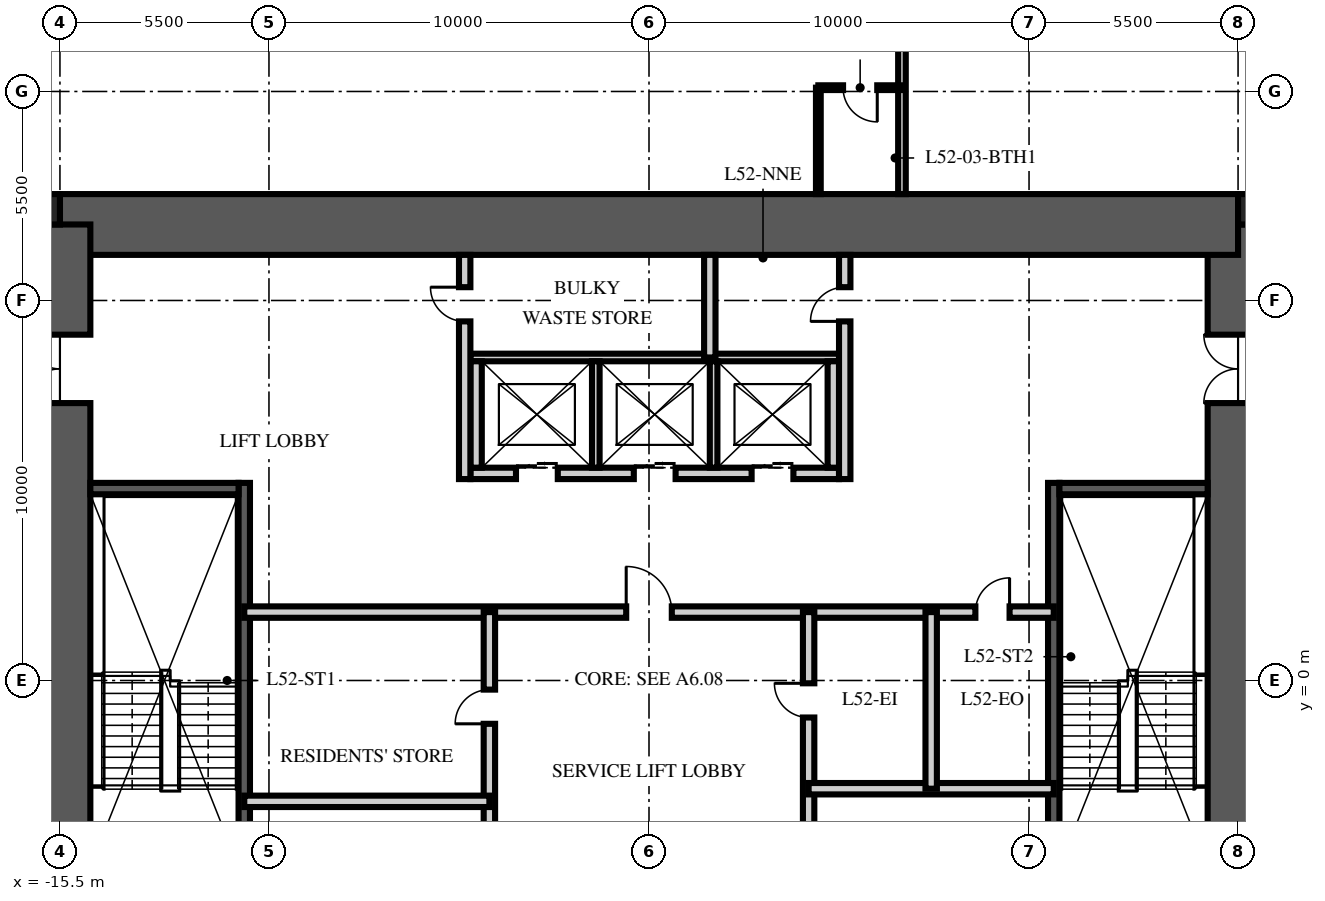
"""IFC4 building model, lengths in metres.
Left out: names, types, materials, properties, quantities, classifications, styles, units other than length and angle.
Written with IfcOpenShell. Run it as: python <this file> out.ifc"""

import sys

from ifc_helpers import new_model, si_unit, direction, frame, frame_2d, origin, origin_2d, place, context, subcontext, project, spatial, rectangle, extrude, element, fill, save


model = new_model("IFC4")
c1 = context("Model", 3, precision=1e-05, world=origin(), true_north=direction((0.0, 1.0)))
c2 = subcontext(c1, "Body", "Model", "MODEL_VIEW")
j1 = project(units=[si_unit("LENGTHUNIT", "METRE"), si_unit("PLANEANGLEUNIT", "RADIAN")], contexts=[c1])
p1 = place(None, origin())
s1 = spatial("IfcSite", under=j1, at=p1, CompositionType="ELEMENT")
p2 = place(p1, origin())
s2 = spatial("IfcBuilding", under=s1, at=p2, CompositionType="ELEMENT")
p3 = place(p2, frame((0.0, 0.0, 210.75)))
s3 = spatial("IfcBuildingStorey", under=s2, at=p3, CompositionType="ELEMENT", Elevation=210.75)
p4 = place(p3, frame((15.5, -12.0, -0.25), z_axis=(0.0, 0.0, 1.0), x_axis=(0.0, 1.0, 0.0)))
e1 = element("IfcWall", 1, at=p4, inside=s3, PredefinedType="SHEAR", context=c2, shape_type="SweptSolid", body=[
    extrude(rectangle(XDim=24.0, YDim=1.6, at=frame_2d((12.0, 0.0))), origin(), (0.0, 0.0, 1.0), 3.75),
])
p5 = place(p4, frame((3.2, 0.0, 0.25)))
e2 = element("IfcOpeningElement", 2, at=p5, cuts=e1, PredefinedType="OPENING", context=c2, shape_type="SweptSolid", body=[
    extrude(rectangle(XDim=1.2, YDim=2.1, at=frame_2d((0.6, 1.05))), frame((0.0, 0.81, 0.0), z_axis=(0.0, -1.0, 0.0), x_axis=(1.0, 0.0, 0.0)), (0.0, 0.0, 1.0), 1.62),
])
p6 = place(p4, frame((19.3, 0.0, 0.25)))
e3 = element("IfcOpeningElement", 3, at=p6, cuts=e1, PredefinedType="OPENING", context=c2, shape_type="SweptSolid", body=[
    extrude(rectangle(XDim=1.8, YDim=2.1, at=frame_2d((0.9, 1.05))), frame((0.0, 0.81, 0.0), z_axis=(0.0, -1.0, 0.0), x_axis=(1.0, 0.0, 0.0)), (0.0, 0.0, 1.0), 1.62),
])
p7 = place(p3, frame((-15.5, 12.0, -0.25), z_axis=(0.0, 0.0, 1.0), x_axis=(1.0, 0.0, 0.0)))
e4 = element("IfcWall", 4, at=p7, inside=s3, PredefinedType="SHEAR", context=c2, shape_type="SweptSolid", body=[
    extrude(rectangle(XDim=31.0, YDim=1.6, at=frame_2d((15.5, 0.0))), origin(), (0.0, 0.0, 1.0), 3.75),
])
p8 = place(p3, frame((-15.5, -12.0, -0.25), z_axis=(0.0, 0.0, 1.0), x_axis=(0.0, 1.0, 0.0)))
e5 = element("IfcWall", 5, at=p8, inside=s3, PredefinedType="SHEAR", context=c2, shape_type="SweptSolid", body=[
    extrude(rectangle(XDim=24.0, YDim=1.6, at=frame_2d((12.0, 0.0))), origin(), (0.0, 0.0, 1.0), 3.75),
])
p9 = place(p8, frame((3.2, 0.0, 0.25)))
e6 = element("IfcOpeningElement", 6, at=p9, cuts=e5, PredefinedType="OPENING", context=c2, shape_type="SweptSolid", body=[
    extrude(rectangle(XDim=1.2, YDim=2.1, at=frame_2d((0.6, 1.05))), frame((0.0, 0.81, 0.0), z_axis=(0.0, -1.0, 0.0), x_axis=(1.0, 0.0, 0.0)), (0.0, 0.0, 1.0), 1.62),
])
p10 = place(p8, frame((19.3, 0.0, 0.25)))
e7 = element("IfcOpeningElement", 7, at=p10, cuts=e5, PredefinedType="OPENING", context=c2, shape_type="SweptSolid", body=[
    extrude(rectangle(XDim=1.8, YDim=2.1, at=frame_2d((0.9, 1.05))), frame((0.0, 0.81, 0.0), z_axis=(0.0, -1.0, 0.0), x_axis=(1.0, 0.0, 0.0)), (0.0, 0.0, 1.0), 1.62),
])
for number, where, z_axis, x_axis in (
    (8, (15.9, 12.4, -0.25), (0.0, 0.0, 1.0), (1.0, 0.0, 0.0)),
    (9, (-15.9, 12.4, -0.25), (0.0, 0.0, 1.0), (1.0, 0.0, 0.0)),
):
    element("IfcColumn", number, at=place(p3, frame(where, z_axis=z_axis, x_axis=x_axis)), inside=s3, PredefinedType="COLUMN", context=c2, shape_type="SweptSolid", body=[
        extrude(rectangle(XDim=0.8, YDim=0.8, at=origin_2d()), origin(), (0.0, 0.0, 1.0), 3.75),
    ])
p11 = place(p3, frame((-10.65, -4.9, 0.0), z_axis=(0.0, 0.0, 1.0), x_axis=(0.0, 1.0, 0.0)))
e10 = element("IfcWall", 10, at=p11, inside=s3, PredefinedType="SOLIDWALL", context=c2, shape_type="SweptSolid", body=[
    extrude(rectangle(XDim=10.1, YDim=0.3, at=frame_2d((5.05, 0.0))), origin(), (0.0, 0.0, 1.0), 3.5),
])
p12 = place(p3, frame((-14.7, 5.05, 0.0), z_axis=(0.0, 0.0, 1.0), x_axis=(1.0, 0.0, 0.0)))
e11 = element("IfcWall", 11, at=p12, inside=s3, PredefinedType="SOLIDWALL", context=c2, shape_type="SweptSolid", body=[
    extrude(rectangle(XDim=3.9, YDim=0.3, at=frame_2d((1.95, 0.0))), origin(), (0.0, 0.0, 1.0), 3.5),
])
p13 = place(p3, frame((10.65, -4.9, 0.0), z_axis=(0.0, 0.0, 1.0), x_axis=(0.0, 1.0, 0.0)))
e12 = element("IfcWall", 12, at=p13, inside=s3, PredefinedType="SOLIDWALL", context=c2, shape_type="SweptSolid", body=[
    extrude(rectangle(XDim=10.1, YDim=0.3, at=frame_2d((5.05, 0.0))), origin(), (0.0, 0.0, 1.0), 3.5),
])
p14 = place(p3, frame((14.7, 5.05, 0.0), z_axis=(0.0, 0.0, 1.0), x_axis=(-1.0, 0.0, 0.0)))
e13 = element("IfcWall", 13, at=p14, inside=s3, PredefinedType="SOLIDWALL", context=c2, shape_type="SweptSolid", body=[
    extrude(rectangle(XDim=3.9, YDim=0.3, at=frame_2d((1.95, 0.0))), origin(), (0.0, 0.0, 1.0), 3.5),
])
p15 = place(p3, frame((-4.7, 5.45, 0.0), z_axis=(0.0, 0.0, 1.0), x_axis=(1.0, 0.0, 0.0)))
e14 = element("IfcWall", 14, at=p15, inside=s3, PredefinedType="PARTITIONING", context=c2, shape_type="SweptSolid", body=[
    extrude(rectangle(XDim=9.7, YDim=0.3, at=frame_2d((4.85, 0.0))), origin(), (0.0, 0.0, 1.0), 3.5),
])
p16 = place(p15, frame((1.2, 0.0, 0.0)))
e15 = element("IfcOpeningElement", 15, at=p16, cuts=e14, PredefinedType="OPENING", context=c2, shape_type="SweptSolid", body=[
    extrude(rectangle(XDim=1.1, YDim=2.1, at=frame_2d((0.55, 1.05))), frame((0.0, 0.16, 0.0), z_axis=(0.0, -1.0, 0.0), x_axis=(1.0, 0.0, 0.0)), (0.0, 0.0, 1.0), 0.32),
])
p17 = place(p15, frame((4.3, 0.0, 0.0)))
e16 = element("IfcOpeningElement", 16, at=p17, cuts=e14, PredefinedType="OPENING", context=c2, shape_type="SweptSolid", body=[
    extrude(rectangle(XDim=1.1, YDim=2.1, at=frame_2d((0.55, 1.05))), frame((0.0, 0.16, 0.0), z_axis=(0.0, -1.0, 0.0), x_axis=(1.0, 0.0, 0.0)), (0.0, 0.0, 1.0), 0.32),
])
p18 = place(p15, frame((7.4, 0.0, 0.0)))
e17 = element("IfcOpeningElement", 17, at=p18, cuts=e14, PredefinedType="OPENING", context=c2, shape_type="SweptSolid", body=[
    extrude(rectangle(XDim=1.1, YDim=2.1, at=frame_2d((0.55, 1.05))), frame((0.0, 0.16, 0.0), z_axis=(0.0, -1.0, 0.0), x_axis=(1.0, 0.0, 0.0)), (0.0, 0.0, 1.0), 0.32),
])
p19 = place(p3, frame((-4.7, 8.5, 0.0), z_axis=(0.0, 0.0, 1.0), x_axis=(1.0, 0.0, 0.0)))
e18 = element("IfcWall", 18, at=p19, inside=s3, PredefinedType="PARTITIONING", context=c2, shape_type="SweptSolid", body=[
    extrude(rectangle(XDim=9.7, YDim=0.2, at=frame_2d((4.85, 0.0))), origin(), (0.0, 0.0, 1.0), 3.5),
])
for number, where, z_axis, x_axis in (
    (19, (-4.55, 5.6, 0.0), (0.0, 0.0, 1.0), (0.0, 1.0, 0.0)),
    (20, (4.85, 5.6, 0.0), (0.0, 0.0, 1.0), (0.0, 1.0, 0.0)),
):
    element("IfcWall", number, at=place(p3, frame(where, z_axis=z_axis, x_axis=x_axis)), inside=s3, PredefinedType="PARTITIONING", context=c2, shape_type="SweptSolid", body=[
        extrude(rectangle(XDim=2.8, YDim=0.3, at=frame_2d((1.4, 0.0))), origin(), (0.0, 0.0, 1.0), 3.5),
    ])
for number, where, z_axis, x_axis in (
    (21, (-1.4, 5.6, 0.0), (0.0, 0.0, 1.0), (0.0, 1.0, 0.0)),
    (22, (1.7, 5.6, 0.0), (0.0, 0.0, 1.0), (0.0, 1.0, 0.0)),
):
    element("IfcWall", number, at=place(p3, frame(where, z_axis=z_axis, x_axis=x_axis)), inside=s3, PredefinedType="PARTITIONING", context=c2, shape_type="SweptSolid", body=[
        extrude(rectangle(XDim=2.8, YDim=0.2, at=frame_2d((1.4, 0.0))), origin(), (0.0, 0.0, 1.0), 3.5),
    ])
p20 = place(p3, frame((-10.65, 1.8, 0.0), z_axis=(0.0, 0.0, 1.0), x_axis=(1.0, 0.0, 0.0)))
e23 = element("IfcWall", 23, at=p20, inside=s3, PredefinedType="PARTITIONING", context=c2, shape_type="SweptSolid", body=[
    extrude(rectangle(XDim=21.3, YDim=0.3, at=frame_2d((10.65, 0.0))), origin(), (0.0, 0.0, 1.0), 3.5),
])
p21 = place(p20, frame((10.05, 0.0, 0.0)))
e24 = element("IfcOpeningElement", 24, at=p21, cuts=e23, PredefinedType="OPENING", context=c2, shape_type="SweptSolid", body=[
    extrude(rectangle(XDim=1.2, YDim=2.1, at=frame_2d((0.6, 1.05))), frame((0.0, 0.16, 0.0), z_axis=(0.0, -1.0, 0.0), x_axis=(1.0, 0.0, 0.0)), (0.0, 0.0, 1.0), 0.32),
])
p22 = place(p20, frame((19.238, 0.0, 0.0)))
e25 = element("IfcOpeningElement", 25, at=p22, cuts=e23, PredefinedType="OPENING", context=c2, shape_type="SweptSolid", body=[
    extrude(rectangle(XDim=0.9, YDim=2.1, at=frame_2d((0.45, 1.05))), frame((0.0, 0.16, 0.0), z_axis=(0.0, -1.0, 0.0), x_axis=(1.0, 0.0, 0.0)), (0.0, 0.0, 1.0), 0.32),
])
p23 = place(p3, frame((-4.2, -6.65, 0.0), z_axis=(0.0, 0.0, 1.0), x_axis=(0.0, 1.0, 0.0)))
e26 = element("IfcWall", 26, at=p23, inside=s3, PredefinedType="PARTITIONING", context=c2, shape_type="SweptSolid", body=[
    extrude(rectangle(XDim=8.45, YDim=0.3, at=frame_2d((4.225, 0.0))), origin(), (0.0, 0.0, 1.0), 3.5),
])
p24 = place(p23, frame((1.285, 0.0, 0.0)))
e27 = element("IfcOpeningElement", 27, at=p24, cuts=e26, PredefinedType="OPENING", context=c2, shape_type="SweptSolid", body=[
    extrude(rectangle(XDim=0.9, YDim=2.1, at=frame_2d((0.45, 1.05))), frame((0.0, 0.16, 0.0), z_axis=(0.0, -1.0, 0.0), x_axis=(1.0, 0.0, 0.0)), (0.0, 0.0, 1.0), 0.32),
])
p25 = place(p23, frame((5.51, 0.0, 0.0)))
e28 = element("IfcOpeningElement", 28, at=p25, cuts=e26, PredefinedType="OPENING", context=c2, shape_type="SweptSolid", body=[
    extrude(rectangle(XDim=0.9, YDim=2.1, at=frame_2d((0.45, 1.05))), frame((0.0, 0.16, 0.0), z_axis=(0.0, -1.0, 0.0), x_axis=(1.0, 0.0, 0.0)), (0.0, 0.0, 1.0), 0.32),
])
p26 = place(p3, frame((4.2, -6.65, 0.0), z_axis=(0.0, 0.0, 1.0), x_axis=(0.0, 1.0, 0.0)))
e29 = element("IfcWall", 29, at=p26, inside=s3, PredefinedType="PARTITIONING", context=c2, shape_type="SweptSolid", body=[
    extrude(rectangle(XDim=8.45, YDim=0.3, at=frame_2d((4.225, 0.0))), origin(), (0.0, 0.0, 1.0), 3.5),
])
p27 = place(p26, frame((1.451, 0.0, 0.0)))
e30 = element("IfcOpeningElement", 30, at=p27, cuts=e29, PredefinedType="OPENING", context=c2, shape_type="SweptSolid", body=[
    extrude(rectangle(XDim=0.9, YDim=2.1, at=frame_2d((0.45, 1.05))), frame((0.0, 0.16, 0.0), z_axis=(0.0, -1.0, 0.0), x_axis=(1.0, 0.0, 0.0)), (0.0, 0.0, 1.0), 0.32),
])
p28 = place(p26, frame((5.676, 0.0, 0.0)))
e31 = element("IfcOpeningElement", 31, at=p28, cuts=e29, PredefinedType="OPENING", context=c2, shape_type="SweptSolid", body=[
    extrude(rectangle(XDim=0.9, YDim=2.1, at=frame_2d((0.45, 1.05))), frame((0.0, 0.16, 0.0), z_axis=(0.0, -1.0, 0.0), x_axis=(1.0, 0.0, 0.0)), (0.0, 0.0, 1.0), 0.32),
])
for number, where, z_axis, x_axis in (
    (32, (-10.65, -3.18, 0.0), (0.0, 0.0, 1.0), (1.0, 0.0, 0.0)),
    (33, (10.65, -2.848, 0.0), (0.0, 0.0, 1.0), (-1.0, 0.0, 0.0)),
):
    element("IfcWall", number, at=place(p3, frame(where, z_axis=z_axis, x_axis=x_axis)), inside=s3, PredefinedType="PARTITIONING", context=c2, shape_type="SweptSolid", body=[
        extrude(rectangle(XDim=6.45, YDim=0.3, at=frame_2d((3.225, 0.0))), origin(), (0.0, 0.0, 1.0), 3.5),
    ])
p29 = place(p3, frame((7.425, -2.848, 0.0), z_axis=(0.0, 0.0, 1.0), x_axis=(0.0, 1.0, 0.0)))
e34 = element("IfcWall", 34, at=p29, inside=s3, PredefinedType="PARTITIONING", context=c2, shape_type="SweptSolid", body=[
    extrude(rectangle(XDim=4.648, YDim=0.3, at=frame_2d((2.324, 0.0))), origin(), (0.0, 0.0, 1.0), 3.5),
])
p30 = place(p3, frame((-4.85, 5.3, 0.0), z_axis=(0.0, 0.0, 1.0), x_axis=(0.0, 1.0, 0.0)))
e35 = element("IfcWall", 35, at=p30, inside=s3, PredefinedType="PARTITIONING", context=c2, shape_type="SweptSolid", body=[
    extrude(rectangle(XDim=5.9, YDim=0.3, at=frame_2d((2.95, 0.0))), origin(), (0.0, 0.0, 1.0), 3.5),
])
p31 = place(p30, frame((4.15, 0.0, 0.0)))
e36 = element("IfcOpeningElement", 36, at=p31, cuts=e35, PredefinedType="OPENING", context=c2, shape_type="SweptSolid", body=[
    extrude(rectangle(XDim=0.9, YDim=2.1, at=frame_2d((0.45, 1.05))), frame((0.0, 0.16, 0.0), z_axis=(0.0, -1.0, 0.0), x_axis=(1.0, 0.0, 0.0)), (0.0, 0.0, 1.0), 0.32),
])
p32 = place(p3, frame((5.15, 5.3, 0.0), z_axis=(0.0, 0.0, 1.0), x_axis=(0.0, 1.0, 0.0)))
e37 = element("IfcWall", 37, at=p32, inside=s3, PredefinedType="PARTITIONING", context=c2, shape_type="SweptSolid", body=[
    extrude(rectangle(XDim=5.9, YDim=0.3, at=frame_2d((2.95, 0.0))), origin(), (0.0, 0.0, 1.0), 3.5),
])
p33 = place(p32, frame((4.15, 0.0, 0.0)))
e38 = element("IfcOpeningElement", 38, at=p33, cuts=e37, PredefinedType="OPENING", context=c2, shape_type="SweptSolid", body=[
    extrude(rectangle(XDim=0.9, YDim=2.1, at=frame_2d((0.45, 1.05))), frame((0.0, 0.16, 0.0), z_axis=(0.0, -1.0, 0.0), x_axis=(1.0, 0.0, 0.0)), (0.0, 0.0, 1.0), 0.32),
])
p34 = place(p3, frame((1.6, 8.5, 0.0), z_axis=(0.0, 0.0, 1.0), x_axis=(0.0, 1.0, 0.0)))
e39 = element("IfcWall", 39, at=p34, inside=s3, PredefinedType="PARTITIONING", context=c2, shape_type="SweptSolid", body=[
    extrude(rectangle(XDim=2.7, YDim=0.3, at=frame_2d((1.35, 0.0))), origin(), (0.0, 0.0, 1.0), 3.5),
])
p35 = place(p3, frame((6.656, 12.8, 0.0), z_axis=(0.0, 0.0, 1.0), x_axis=(0.0, 1.0, 0.0)))
e40 = element("IfcWall", 40, at=p35, inside=s3, PredefinedType="PARTITIONING", context=c2, shape_type="SweptSolid", body=[
    extrude(rectangle(XDim=13.65, YDim=0.2, at=frame_2d((6.825, 0.0))), origin(), (0.0, 0.0, 1.0), 2.91),
])
p36 = place(p3, frame((6.656, 15.6, 0.0), z_axis=(0.0, 0.0, 1.0), x_axis=(-1.0, 0.0, 0.0)))
e41 = element("IfcWall", 41, at=p36, inside=s3, PredefinedType="PARTITIONING", context=c2, shape_type="SweptSolid", body=[
    extrude(rectangle(XDim=2.2, YDim=0.125, at=frame_2d((1.1, 0.0))), origin(), (0.0, 0.0, 1.0), 3.5),
])
p37 = place(p36, frame((0.65, 0.0, 0.0)))
e42 = element("IfcOpeningElement", 42, at=p37, cuts=e41, PredefinedType="OPENING", context=c2, shape_type="SweptSolid", body=[
    extrude(rectangle(XDim=0.9, YDim=2.1, at=frame_2d((0.45, 1.05))), frame((0.0, 0.073, 0.0), z_axis=(0.0, -1.0, 0.0), x_axis=(1.0, 0.0, 0.0)), (0.0, 0.0, 1.0), 0.145),
])
p38 = place(p3, frame((4.456, 12.8, 0.0), z_axis=(0.0, 0.0, 1.0), x_axis=(0.0, 1.0, 0.0)))
e43 = element("IfcWall", 43, at=p38, inside=s3, PredefinedType="PARTITIONING", context=c2, shape_type="SweptSolid", body=[
    extrude(rectangle(XDim=2.8, YDim=0.125, at=frame_2d((1.4, 0.0))), origin(), (0.0, 0.0, 1.0), 3.5),
])
p39 = place(p10, origin())
e44 = element("IfcDoor", 44, at=p39, inside=s3, OperationType="DOUBLE_DOOR_SINGLE_SWING", PredefinedType="DOOR", context=c2, shape_type="SweptSolid", body=[
    extrude(rectangle(XDim=1.8, YDim=2.1, at=frame_2d((0.9, 1.05))), frame((0.0, 0.025, 0.0), z_axis=(0.0, -1.0, 0.0), x_axis=(1.0, 0.0, 0.0)), (0.0, 0.0, 1.0), 0.05),
])
fill(e7, e44)
p40 = place(p6, origin())
e45 = element("IfcDoor", 45, at=p40, inside=s3, OperationType="DOUBLE_DOOR_SINGLE_SWING", PredefinedType="DOOR", context=c2, shape_type="SweptSolid", body=[
    extrude(rectangle(XDim=1.8, YDim=2.1, at=frame_2d((0.9, 1.05))), frame((0.0, 0.025, 0.0), z_axis=(0.0, -1.0, 0.0), x_axis=(1.0, 0.0, 0.0)), (0.0, 0.0, 1.0), 0.05),
])
fill(e3, e45)
p41 = place(p16, origin())
e46 = element("IfcDoor", 46, at=p41, inside=s3, OperationType="DOUBLE_DOOR_SLIDING", PredefinedType="DOOR", context=c2, shape_type="SweptSolid", body=[
    extrude(rectangle(XDim=1.1, YDim=2.1, at=frame_2d((0.55, 1.05))), frame((0.0, 0.025, 0.0), z_axis=(0.0, -1.0, 0.0), x_axis=(1.0, 0.0, 0.0)), (0.0, 0.0, 1.0), 0.05),
])
fill(e15, e46)
p42 = place(p17, origin())
e47 = element("IfcDoor", 47, at=p42, inside=s3, OperationType="DOUBLE_DOOR_SLIDING", PredefinedType="DOOR", context=c2, shape_type="SweptSolid", body=[
    extrude(rectangle(XDim=1.1, YDim=2.1, at=frame_2d((0.55, 1.05))), frame((0.0, 0.025, 0.0), z_axis=(0.0, -1.0, 0.0), x_axis=(1.0, 0.0, 0.0)), (0.0, 0.0, 1.0), 0.05),
])
fill(e16, e47)
p43 = place(p18, origin())
e48 = element("IfcDoor", 48, at=p43, inside=s3, OperationType="DOUBLE_DOOR_SLIDING", PredefinedType="DOOR", context=c2, shape_type="SweptSolid", body=[
    extrude(rectangle(XDim=1.1, YDim=2.1, at=frame_2d((0.55, 1.05))), frame((0.0, 0.025, 0.0), z_axis=(0.0, -1.0, 0.0), x_axis=(1.0, 0.0, 0.0)), (0.0, 0.0, 1.0), 0.05),
])
fill(e17, e48)
p44 = place(p21, origin())
e49 = element("IfcDoor", 49, at=p44, inside=s3, OperationType="SINGLE_SWING_LEFT", PredefinedType="DOOR", context=c2, shape_type="SweptSolid", body=[
    extrude(rectangle(XDim=1.2, YDim=2.1, at=frame_2d((0.6, 1.05))), frame((0.0, 0.025, 0.0), z_axis=(0.0, -1.0, 0.0), x_axis=(1.0, 0.0, 0.0)), (0.0, 0.0, 1.0), 0.05),
])
fill(e24, e49)
p45 = place(p25, origin())
e50 = element("IfcDoor", 50, at=p45, inside=s3, OperationType="SINGLE_SWING_LEFT", PredefinedType="DOOR", context=c2, shape_type="SweptSolid", body=[
    extrude(rectangle(XDim=0.9, YDim=2.1, at=frame_2d((0.45, 1.05))), frame((0.0, 0.025, 0.0), z_axis=(0.0, -1.0, 0.0), x_axis=(1.0, 0.0, 0.0)), (0.0, 0.0, 1.0), 0.05),
])
fill(e28, e50)
p46 = place(p28, origin())
e51 = element("IfcDoor", 51, at=p46, inside=s3, OperationType="SINGLE_SWING_RIGHT", PredefinedType="DOOR", context=c2, shape_type="SweptSolid", body=[
    extrude(rectangle(XDim=0.9, YDim=2.1, at=frame_2d((0.45, 1.05))), frame((0.0, 0.025, 0.0), z_axis=(0.0, -1.0, 0.0), x_axis=(1.0, 0.0, 0.0)), (0.0, 0.0, 1.0), 0.05),
])
fill(e31, e51)
p47 = place(p22, origin())
e52 = element("IfcDoor", 52, at=p47, inside=s3, OperationType="SINGLE_SWING_RIGHT", PredefinedType="DOOR", context=c2, shape_type="SweptSolid", body=[
    extrude(rectangle(XDim=0.9, YDim=2.1, at=frame_2d((0.45, 1.05))), frame((0.0, 0.025, 0.0), z_axis=(0.0, -1.0, 0.0), x_axis=(1.0, 0.0, 0.0)), (0.0, 0.0, 1.0), 0.05),
])
fill(e25, e52)
p48 = place(p31, origin())
e53 = element("IfcDoor", 53, at=p48, inside=s3, OperationType="SINGLE_SWING_RIGHT", PredefinedType="DOOR", context=c2, shape_type="SweptSolid", body=[
    extrude(rectangle(XDim=0.9, YDim=2.1, at=frame_2d((0.45, 1.05))), frame((0.0, 0.025, 0.0), z_axis=(0.0, -1.0, 0.0), x_axis=(1.0, 0.0, 0.0)), (0.0, 0.0, 1.0), 0.05),
])
fill(e36, e53)
p49 = place(p33, origin())
e54 = element("IfcDoor", 54, at=p49, inside=s3, OperationType="SINGLE_SWING_LEFT", PredefinedType="DOOR", context=c2, shape_type="SweptSolid", body=[
    extrude(rectangle(XDim=0.9, YDim=2.1, at=frame_2d((0.45, 1.05))), frame((0.0, 0.025, 0.0), z_axis=(0.0, -1.0, 0.0), x_axis=(1.0, 0.0, 0.0)), (0.0, 0.0, 1.0), 0.05),
])
fill(e38, e54)
p50 = place(p37, origin())
e55 = element("IfcDoor", 55, at=p50, inside=s3, OperationType="SINGLE_SWING_LEFT", PredefinedType="DOOR", context=c2, shape_type="SweptSolid", body=[
    extrude(rectangle(XDim=0.9, YDim=2.1, at=frame_2d((0.45, 1.05))), frame((0.0, 0.025, 0.0), z_axis=(0.0, -1.0, 0.0), x_axis=(1.0, 0.0, 0.0)), (0.0, 0.0, 1.0), 0.05),
])
fill(e42, e55)
save(model, sys.argv[1])
